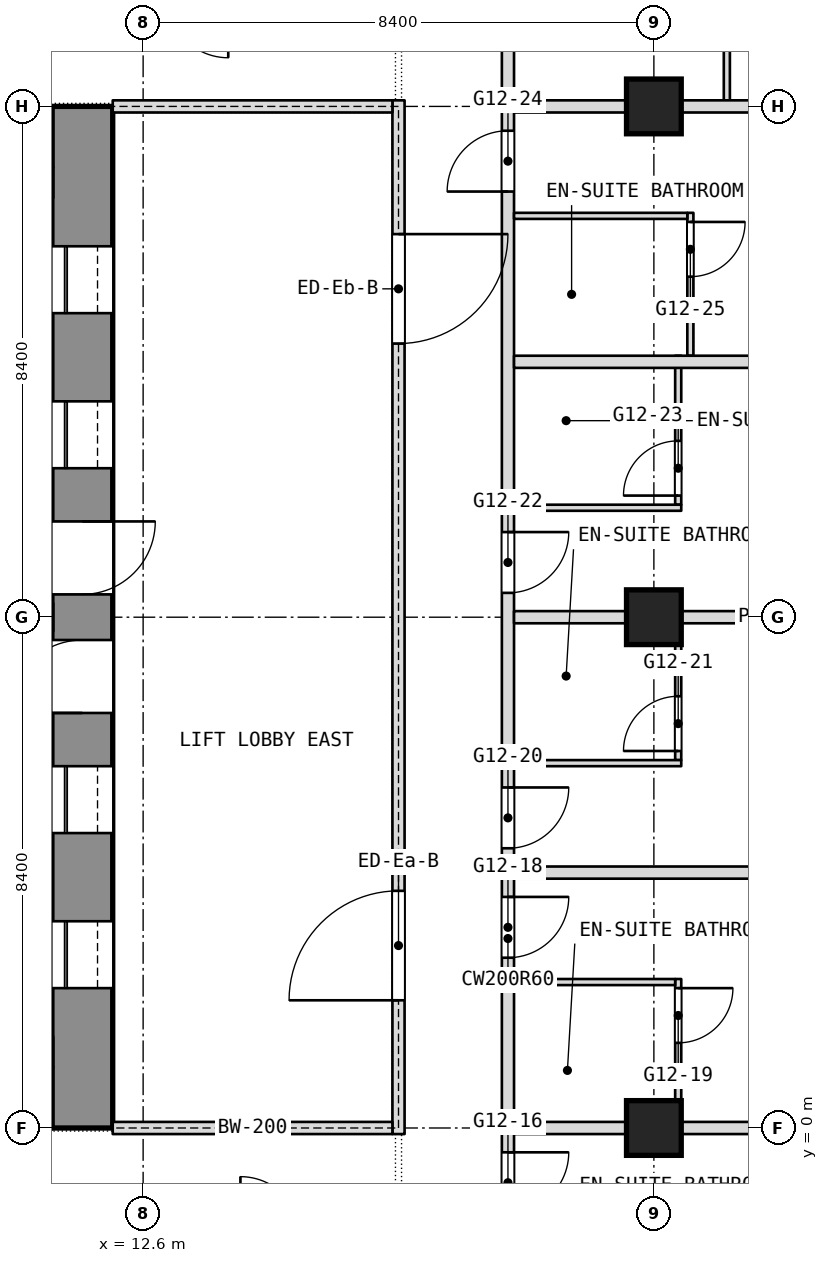
"""IFC4 building model, lengths in metres.
Left out: names, types, materials, properties, quantities, classifications, styles, units other than length and angle.
Written with IfcOpenShell. Run it as: python <this file> out.ifc"""

import sys

from ifc_helpers import new_model, si_unit, direction, frame, frame_2d, origin, origin_2d, place, context, subcontext, project, spatial, rectangle, extrude, element, fill, save


model = new_model("IFC4")
c1 = context("Model", 3, precision=1e-05, world=origin(), true_north=direction((0.0, 1.0)))
c2 = subcontext(c1, "Body", "Model", "MODEL_VIEW")
j1 = project(units=[si_unit("LENGTHUNIT", "METRE"), si_unit("PLANEANGLEUNIT", "RADIAN")], contexts=[c1])
p1 = place(None, origin())
s1 = spatial("IfcSite", under=j1, at=p1, CompositionType="ELEMENT")
p2 = place(p1, origin())
s2 = spatial("IfcBuilding", under=s1, at=p2, CompositionType="ELEMENT")
p3 = place(p2, frame((0.0, 0.0, 137.3)))
s3 = spatial("IfcBuildingStorey", under=s2, at=p3, CompositionType="ELEMENT", Elevation=137.3)
p4 = place(p3, frame((11.6, 0.0, 0.0), z_axis=(0.0, 0.0, 1.0), x_axis=(0.0, 1.0, 0.0)))
e1 = element("IfcWall", 1, at=p4, inside=s3, PredefinedType="SHEAR", context=c2, shape_type="SweptSolid", body=[
    extrude(rectangle(XDim=16.8, YDim=1.0, at=frame_2d((8.4, 0.0))), origin(), (0.0, 0.0, 1.0), 3.6),
])
p5 = place(p4, frame((2.3, 0.0, 0.0)))
e2 = element("IfcOpeningElement", 2, at=p5, cuts=e1, PredefinedType="OPENING", context=c2, shape_type="SweptSolid", body=[
    extrude(rectangle(XDim=1.1, YDim=2.1, at=frame_2d((0.55, 1.05))), frame((0.0, 0.5, 0.0), z_axis=(0.0, -1.0, 0.0), x_axis=(1.0, 0.0, 0.0)), (0.0, 0.0, 1.0), 1.0),
])
p6 = place(p4, frame((4.85, 0.0, 0.0)))
e3 = element("IfcOpeningElement", 3, at=p6, cuts=e1, PredefinedType="OPENING", context=c2, shape_type="SweptSolid", body=[
    extrude(rectangle(XDim=1.1, YDim=2.1, at=frame_2d((0.55, 1.05))), frame((0.0, 0.5, 0.0), z_axis=(0.0, -1.0, 0.0), x_axis=(1.0, 0.0, 0.0)), (0.0, 0.0, 1.0), 1.0),
])
p7 = place(p4, frame((6.825, 0.0, 0.0)))
e4 = element("IfcOpeningElement", 4, at=p7, cuts=e1, PredefinedType="OPENING", context=c2, shape_type="SweptSolid", body=[
    extrude(rectangle(XDim=1.2, YDim=2.1, at=frame_2d((0.6, 1.05))), frame((0.0, 0.5, 0.0), z_axis=(0.0, -1.0, 0.0), x_axis=(1.0, 0.0, 0.0)), (0.0, 0.0, 1.0), 1.0),
])
p8 = place(p4, frame((13.4, 0.0, 0.0)))
e5 = element("IfcOpeningElement", 5, at=p8, cuts=e1, PredefinedType="OPENING", context=c2, shape_type="SweptSolid", body=[
    extrude(rectangle(XDim=1.1, YDim=2.1, at=frame_2d((0.55, 1.05))), frame((0.0, 0.5, 0.0), z_axis=(0.0, -1.0, 0.0), x_axis=(1.0, 0.0, 0.0)), (0.0, 0.0, 1.0), 1.0),
])
p9 = place(p4, frame((10.85, 0.0, 0.0)))
e6 = element("IfcOpeningElement", 6, at=p9, cuts=e1, PredefinedType="OPENING", context=c2, shape_type="SweptSolid", body=[
    extrude(rectangle(XDim=1.1, YDim=2.1, at=frame_2d((0.55, 1.05))), frame((0.0, 0.5, 0.0), z_axis=(0.0, -1.0, 0.0), x_axis=(1.0, 0.0, 0.0)), (0.0, 0.0, 1.0), 1.0),
])
p10 = place(p4, frame((8.775, 0.0, 0.0)))
e7 = element("IfcOpeningElement", 7, at=p10, cuts=e1, PredefinedType="OPENING", context=c2, shape_type="SweptSolid", body=[
    extrude(rectangle(XDim=1.2, YDim=2.1, at=frame_2d((0.6, 1.05))), frame((0.0, 0.5, 0.0), z_axis=(0.0, -1.0, 0.0), x_axis=(1.0, 0.0, 0.0)), (0.0, 0.0, 1.0), 1.0),
])
for number, where, z_axis, x_axis in (
    (8, (21.0, 0.0, 0.0), (0.0, 0.0, 1.0), (1.0, 0.0, 0.0)),
    (9, (21.0, 8.4, 0.0), (0.0, 0.0, 1.0), (1.0, 0.0, 0.0)),
    (10, (21.0, 16.8, 0.0), (0.0, 0.0, 1.0), (1.0, 0.0, 0.0)),
):
    element("IfcColumn", number, at=place(p3, frame(where, z_axis=z_axis, x_axis=x_axis)), inside=s3, PredefinedType="COLUMN", context=c2, shape_type="SweptSolid", body=[
        extrude(rectangle(XDim=0.9, YDim=0.9, at=origin_2d()), origin(), (0.0, 0.0, 1.0), 3.6),
    ])
p11 = place(p3, frame((22.2, 16.9, 0.0), z_axis=(0.0, 0.0, 1.0), x_axis=(0.0, 1.0, 0.0)))
e11 = element("IfcWall", 11, at=p11, inside=s3, PredefinedType="PARTITIONING", context=c2, shape_type="SweptSolid", body=[
    extrude(rectangle(XDim=3.55, YDim=0.1, at=frame_2d((1.775, 0.0))), origin(), (0.0, 0.0, 1.0), 3.34),
])
p12 = place(p11, frame((2.5, 0.0, 0.0)))
e12 = element("IfcOpeningElement", 12, at=p12, cuts=e11, PredefinedType="OPENING", context=c2, shape_type="SweptSolid", body=[
    extrude(rectangle(XDim=0.9, YDim=2.1, at=frame_2d((0.45, 1.05))), frame((0.0, 0.05, 0.0), z_axis=(0.0, -1.0, 0.0), x_axis=(1.0, 0.0, 0.0)), (0.0, 0.0, 1.0), 0.1),
])
p13 = place(p3, frame((21.6, 12.7, 0.0), z_axis=(0.0, 0.0, 1.0), x_axis=(0.0, 1.0, 0.0)))
e13 = element("IfcWall", 13, at=p13, inside=s3, PredefinedType="PARTITIONING", context=c2, shape_type="SweptSolid", body=[
    extrude(rectangle(XDim=2.35, YDim=0.1, at=frame_2d((1.175, 0.0))), origin(), (0.0, 0.0, 1.0), 3.34),
])
p14 = place(p13, frame((1.3, 0.0, 0.0)))
e14 = element("IfcOpeningElement", 14, at=p14, cuts=e13, PredefinedType="OPENING", context=c2, shape_type="SweptSolid", body=[
    extrude(rectangle(XDim=0.9, YDim=2.1, at=frame_2d((0.45, 1.05))), frame((0.0, 0.05, 0.0), z_axis=(0.0, -1.0, 0.0), x_axis=(1.0, 0.0, 0.0)), (0.0, 0.0, 1.0), 0.1),
])
p15 = place(p3, frame((21.4, 0.1, 0.0), z_axis=(0.0, 0.0, 1.0), x_axis=(0.0, 1.0, 0.0)))
e15 = element("IfcWall", 15, at=p15, inside=s3, PredefinedType="PARTITIONING", context=c2, shape_type="SweptSolid", body=[
    extrude(rectangle(XDim=2.35, YDim=0.1, at=frame_2d((1.175, 0.0))), origin(), (0.0, 0.0, 1.0), 3.34),
])
p16 = place(p15, frame((1.3, 0.0, 0.0)))
e16 = element("IfcOpeningElement", 16, at=p16, cuts=e15, PredefinedType="OPENING", context=c2, shape_type="SweptSolid", body=[
    extrude(rectangle(XDim=0.9, YDim=2.1, at=frame_2d((0.45, 1.05))), frame((0.0, 0.05, 0.0), z_axis=(0.0, -1.0, 0.0), x_axis=(1.0, 0.0, 0.0)), (0.0, 0.0, 1.0), 0.1),
])
p17 = place(p3, frame((21.4, 6.05, 0.0), z_axis=(0.0, 0.0, 1.0), x_axis=(0.0, 1.0, 0.0)))
e17 = element("IfcWall", 17, at=p17, inside=s3, PredefinedType="PARTITIONING", context=c2, shape_type="SweptSolid", body=[
    extrude(rectangle(XDim=2.45, YDim=0.1, at=frame_2d((1.225, 0.0))), origin(), (0.0, 0.0, 1.0), 3.34),
])
p18 = place(p17, frame((0.15, 0.0, 0.0)))
e18 = element("IfcOpeningElement", 18, at=p18, cuts=e17, PredefinedType="OPENING", context=c2, shape_type="SweptSolid", body=[
    extrude(rectangle(XDim=0.9, YDim=2.1, at=frame_2d((0.45, 1.05))), frame((0.0, 0.05, 0.0), z_axis=(0.0, -1.0, 0.0), x_axis=(1.0, 0.0, 0.0)), (0.0, 0.0, 1.0), 0.1),
])
p19 = place(p3, frame((21.4, 10.25, 0.0), z_axis=(0.0, 0.0, 1.0), x_axis=(0.0, 1.0, 0.0)))
e19 = element("IfcWall", 19, at=p19, inside=s3, PredefinedType="PARTITIONING", context=c2, shape_type="SweptSolid", body=[
    extrude(rectangle(XDim=2.45, YDim=0.1, at=frame_2d((1.225, 0.0))), origin(), (0.0, 0.0, 1.0), 3.34),
])
p20 = place(p19, frame((0.15, 0.0, 0.0)))
e20 = element("IfcOpeningElement", 20, at=p20, cuts=e19, PredefinedType="OPENING", context=c2, shape_type="SweptSolid", body=[
    extrude(rectangle(XDim=0.9, YDim=2.1, at=frame_2d((0.45, 1.05))), frame((0.0, 0.05, 0.0), z_axis=(0.0, -1.0, 0.0), x_axis=(1.0, 0.0, 0.0)), (0.0, 0.0, 1.0), 0.1),
])
p21 = place(p3, frame((18.6, -21.708, 0.0), z_axis=(0.0, 0.0, 1.0), x_axis=(0.0, 1.0, 0.0)))
e21 = element("IfcWall", 21, at=p21, inside=s3, PredefinedType="PARTITIONING", context=c2, shape_type="SweptSolid", body=[
    extrude(rectangle(XDim=49.648, YDim=0.2, at=frame_2d((24.824, 0.0))), origin(), (0.0, 0.0, 1.0), 3.34),
])
p22 = place(p21, frame((2.8, 0.0, 0.0)))
e22 = element("IfcOpeningElement", 22, at=p22, cuts=e21, PredefinedType="OPENING", context=c2, shape_type="SweptSolid", body=[
    extrude(rectangle(XDim=1.0, YDim=2.1, at=frame_2d((0.5, 1.05))), frame((0.0, 0.1, 0.0), z_axis=(0.0, -1.0, 0.0), x_axis=(1.0, 0.0, 0.0)), (0.0, 0.0, 1.0), 0.2),
])
p23 = place(p21, frame((7.708, 0.0, 0.0)))
e23 = element("IfcOpeningElement", 23, at=p23, cuts=e21, PredefinedType="OPENING", context=c2, shape_type="SweptSolid", body=[
    extrude(rectangle(XDim=1.0, YDim=2.1, at=frame_2d((0.5, 1.05))), frame((0.0, 0.1, 0.0), z_axis=(0.0, -1.0, 0.0), x_axis=(1.0, 0.0, 0.0)), (0.0, 0.0, 1.0), 0.2),
])
p24 = place(p21, frame((9.508, 0.0, 0.0)))
e24 = element("IfcOpeningElement", 24, at=p24, cuts=e21, PredefinedType="OPENING", context=c2, shape_type="SweptSolid", body=[
    extrude(rectangle(XDim=1.0, YDim=2.1, at=frame_2d((0.5, 1.05))), frame((0.0, 0.1, 0.0), z_axis=(0.0, -1.0, 0.0), x_axis=(1.0, 0.0, 0.0)), (0.0, 0.0, 1.0), 0.2),
])
p25 = place(p21, frame((13.708, 0.0, 0.0)))
e25 = element("IfcOpeningElement", 25, at=p25, cuts=e21, PredefinedType="OPENING", context=c2, shape_type="SweptSolid", body=[
    extrude(rectangle(XDim=1.0, YDim=2.1, at=frame_2d((0.5, 1.05))), frame((0.0, 0.1, 0.0), z_axis=(0.0, -1.0, 0.0), x_axis=(1.0, 0.0, 0.0)), (0.0, 0.0, 1.0), 0.2),
])
p26 = place(p21, frame((20.308, 0.0, 0.0)))
e26 = element("IfcOpeningElement", 26, at=p26, cuts=e21, PredefinedType="OPENING", context=c2, shape_type="SweptSolid", body=[
    extrude(rectangle(XDim=1.0, YDim=2.1, at=frame_2d((0.5, 1.05))), frame((0.0, 0.1, 0.0), z_axis=(0.0, -1.0, 0.0), x_axis=(1.0, 0.0, 0.0)), (0.0, 0.0, 1.0), 0.2),
])
p27 = place(p21, frame((24.508, 0.0, 0.0)))
e27 = element("IfcOpeningElement", 27, at=p27, cuts=e21, PredefinedType="OPENING", context=c2, shape_type="SweptSolid", body=[
    extrude(rectangle(XDim=1.0, YDim=2.1, at=frame_2d((0.5, 1.05))), frame((0.0, 0.1, 0.0), z_axis=(0.0, -1.0, 0.0), x_axis=(1.0, 0.0, 0.0)), (0.0, 0.0, 1.0), 0.2),
])
p28 = place(p21, frame((26.308, 0.0, 0.0)))
e28 = element("IfcOpeningElement", 28, at=p28, cuts=e21, PredefinedType="OPENING", context=c2, shape_type="SweptSolid", body=[
    extrude(rectangle(XDim=1.0, YDim=2.1, at=frame_2d((0.5, 1.05))), frame((0.0, 0.1, 0.0), z_axis=(0.0, -1.0, 0.0), x_axis=(1.0, 0.0, 0.0)), (0.0, 0.0, 1.0), 0.2),
])
p29 = place(p21, frame((30.508, 0.0, 0.0)))
e29 = element("IfcOpeningElement", 29, at=p29, cuts=e21, PredefinedType="OPENING", context=c2, shape_type="SweptSolid", body=[
    extrude(rectangle(XDim=1.0, YDim=2.1, at=frame_2d((0.5, 1.05))), frame((0.0, 0.1, 0.0), z_axis=(0.0, -1.0, 0.0), x_axis=(1.0, 0.0, 0.0)), (0.0, 0.0, 1.0), 0.2),
])
p30 = place(p21, frame((37.108, 0.0, 0.0)))
e30 = element("IfcOpeningElement", 30, at=p30, cuts=e21, PredefinedType="OPENING", context=c2, shape_type="SweptSolid", body=[
    extrude(rectangle(XDim=1.0, YDim=2.1, at=frame_2d((0.5, 1.05))), frame((0.0, 0.1, 0.0), z_axis=(0.0, -1.0, 0.0), x_axis=(1.0, 0.0, 0.0)), (0.0, 0.0, 1.0), 0.2),
])
p31 = place(p21, frame((43.558, 0.0, 0.0)))
e31 = element("IfcOpeningElement", 31, at=p31, cuts=e21, PredefinedType="OPENING", context=c2, shape_type="SweptSolid", body=[
    extrude(rectangle(XDim=1.1, YDim=2.1, at=frame_2d((0.55, 1.05))), frame((0.0, 0.1, 0.0), z_axis=(0.0, -1.0, 0.0), x_axis=(1.0, 0.0, 0.0)), (0.0, 0.0, 1.0), 0.2),
])
p32 = place(p3, frame((18.7, 0.0, 0.0), z_axis=(0.0, 0.0, 1.0), x_axis=(1.0, 0.0, 0.0)))
e32 = element("IfcWall", 32, at=p32, inside=s3, PredefinedType="PARTITIONING", context=c2, shape_type="SweptSolid", body=[
    extrude(rectangle(XDim=8.9, YDim=0.2, at=frame_2d((4.45, 0.0))), origin(), (0.0, 0.0, 1.0), 2.89),
])
p33 = place(p3, frame((18.7, 2.4, 0.0), z_axis=(0.0, 0.0, 1.0), x_axis=(1.0, 0.0, 0.0)))
e33 = element("IfcWall", 33, at=p33, inside=s3, PredefinedType="PARTITIONING", context=c2, shape_type="SweptSolid", body=[
    extrude(rectangle(XDim=2.65, YDim=0.1, at=frame_2d((1.325, 0.0))), origin(), (0.0, 0.0, 1.0), 3.34),
])
p34 = place(p3, frame((18.7, 4.2, 0.0), z_axis=(0.0, 0.0, 1.0), x_axis=(1.0, 0.0, 0.0)))
e34 = element("IfcWall", 34, at=p34, inside=s3, PredefinedType="PARTITIONING", context=c2, shape_type="SweptSolid", body=[
    extrude(rectangle(XDim=6.8, YDim=0.2, at=frame_2d((3.4, 0.0))), origin(), (0.0, 0.0, 1.0), 3.34),
])
p35 = place(p3, frame((18.7, 6.0, 0.0), z_axis=(0.0, 0.0, 1.0), x_axis=(1.0, 0.0, 0.0)))
e35 = element("IfcWall", 35, at=p35, inside=s3, PredefinedType="PARTITIONING", context=c2, shape_type="SweptSolid", body=[
    extrude(rectangle(XDim=2.75, YDim=0.1, at=frame_2d((1.375, 0.0))), origin(), (0.0, 0.0, 1.0), 3.34),
])
p36 = place(p3, frame((18.7, 8.4, 0.0), z_axis=(0.0, 0.0, 1.0), x_axis=(1.0, 0.0, 0.0)))
e36 = element("IfcWall", 36, at=p36, inside=s3, PredefinedType="PARTITIONING", context=c2, shape_type="SweptSolid", body=[
    extrude(rectangle(XDim=8.9, YDim=0.2, at=frame_2d((4.45, 0.0))), origin(), (0.0, 0.0, 1.0), 2.89),
])
p37 = place(p3, frame((18.7, 10.2, 0.0), z_axis=(0.0, 0.0, 1.0), x_axis=(1.0, 0.0, 0.0)))
e37 = element("IfcWall", 37, at=p37, inside=s3, PredefinedType="PARTITIONING", context=c2, shape_type="SweptSolid", body=[
    extrude(rectangle(XDim=2.75, YDim=0.1, at=frame_2d((1.375, 0.0))), origin(), (0.0, 0.0, 1.0), 3.34),
])
p38 = place(p3, frame((18.7, 12.6, 0.0), z_axis=(0.0, 0.0, 1.0), x_axis=(1.0, 0.0, 0.0)))
e38 = element("IfcWall", 38, at=p38, inside=s3, PredefinedType="PARTITIONING", context=c2, shape_type="SweptSolid", body=[
    extrude(rectangle(XDim=8.9, YDim=0.2, at=frame_2d((4.45, 0.0))), origin(), (0.0, 0.0, 1.0), 3.34),
])
p39 = place(p3, frame((18.7, 15.0, 0.0), z_axis=(0.0, 0.0, 1.0), x_axis=(1.0, 0.0, 0.0)))
e39 = element("IfcWall", 39, at=p39, inside=s3, PredefinedType="PARTITIONING", context=c2, shape_type="SweptSolid", body=[
    extrude(rectangle(XDim=2.85, YDim=0.1, at=frame_2d((1.425, 0.0))), origin(), (0.0, 0.0, 1.0), 3.34),
])
p40 = place(p3, frame((18.7, 16.8, 0.0), z_axis=(0.0, 0.0, 1.0), x_axis=(1.0, 0.0, 0.0)))
e40 = element("IfcWall", 40, at=p40, inside=s3, PredefinedType="PARTITIONING", context=c2, shape_type="SweptSolid", body=[
    extrude(rectangle(XDim=8.9, YDim=0.2, at=frame_2d((4.45, 0.0))), origin(), (0.0, 0.0, 1.0), 2.89),
])
p41 = place(p3, frame((16.8, -0.1, 0.0), z_axis=(0.0, 0.0, 1.0), x_axis=(0.0, 1.0, 0.0)))
e41 = element("IfcWall", 41, at=p41, inside=s3, PredefinedType="PARTITIONING", context=c2, shape_type="SweptSolid", body=[
    extrude(rectangle(XDim=17.0, YDim=0.2, at=frame_2d((8.5, 0.0))), origin(), (0.0, 0.0, 1.0), 3.34),
])
p42 = place(p41, frame((2.2, 0.0, 0.0)))
e42 = element("IfcOpeningElement", 42, at=p42, cuts=e41, PredefinedType="OPENING", context=c2, shape_type="SweptSolid", body=[
    extrude(rectangle(XDim=1.8, YDim=2.1, at=frame_2d((0.9, 1.05))), frame((0.0, 0.1, 0.0), z_axis=(0.0, -1.0, 0.0), x_axis=(1.0, 0.0, 0.0)), (0.0, 0.0, 1.0), 0.2),
])
p43 = place(p41, frame((13.0, 0.0, 0.0)))
e43 = element("IfcOpeningElement", 43, at=p43, cuts=e41, PredefinedType="OPENING", context=c2, shape_type="SweptSolid", body=[
    extrude(rectangle(XDim=1.8, YDim=2.1, at=frame_2d((0.9, 1.05))), frame((0.0, 0.1, 0.0), z_axis=(0.0, -1.0, 0.0), x_axis=(1.0, 0.0, 0.0)), (0.0, 0.0, 1.0), 0.2),
])
for number, where, z_axis, x_axis in (
    (44, (12.1, 0.0, 0.0), (0.0, 0.0, 1.0), (1.0, 0.0, 0.0)),
    (45, (12.1, 16.8, 0.0), (0.0, 0.0, 1.0), (1.0, 0.0, 0.0)),
):
    element("IfcWall", number, at=place(p3, frame(where, z_axis=z_axis, x_axis=x_axis)), inside=s3, PredefinedType="PARTITIONING", context=c2, shape_type="SweptSolid", body=[
        extrude(rectangle(XDim=4.6, YDim=0.2, at=frame_2d((2.3, 0.0))), origin(), (0.0, 0.0, 1.0), 2.89),
    ])
p44 = place(p14, origin())
e46 = element("IfcDoor", 46, at=p44, inside=s3, OperationType="SINGLE_SWING_RIGHT", PredefinedType="DOOR", context=c2, shape_type="SweptSolid", body=[
    extrude(rectangle(XDim=0.9, YDim=2.1, at=frame_2d((0.45, 1.05))), frame((0.0, 0.025, 0.0), z_axis=(0.0, -1.0, 0.0), x_axis=(1.0, 0.0, 0.0)), (0.0, 0.0, 1.0), 0.05),
])
fill(e14, e46)
p45 = place(p16, origin())
e47 = element("IfcDoor", 47, at=p45, inside=s3, OperationType="SINGLE_SWING_RIGHT", PredefinedType="DOOR", context=c2, shape_type="SweptSolid", body=[
    extrude(rectangle(XDim=0.9, YDim=2.1, at=frame_2d((0.45, 1.05))), frame((0.0, 0.025, 0.0), z_axis=(0.0, -1.0, 0.0), x_axis=(1.0, 0.0, 0.0)), (0.0, 0.0, 1.0), 0.05),
])
fill(e16, e47)
p46 = place(p18, origin())
e48 = element("IfcDoor", 48, at=p46, inside=s3, OperationType="SINGLE_SWING_LEFT", PredefinedType="DOOR", context=c2, shape_type="SweptSolid", body=[
    extrude(rectangle(XDim=0.9, YDim=2.1, at=frame_2d((0.45, 1.05))), frame((0.0, 0.025, 0.0), z_axis=(0.0, -1.0, 0.0), x_axis=(1.0, 0.0, 0.0)), (0.0, 0.0, 1.0), 0.05),
])
fill(e18, e48)
p47 = place(p20, origin())
e49 = element("IfcDoor", 49, at=p47, inside=s3, OperationType="SINGLE_SWING_LEFT", PredefinedType="DOOR", context=c2, shape_type="SweptSolid", body=[
    extrude(rectangle(XDim=0.9, YDim=2.1, at=frame_2d((0.45, 1.05))), frame((0.0, 0.025, 0.0), z_axis=(0.0, -1.0, 0.0), x_axis=(1.0, 0.0, 0.0)), (0.0, 0.0, 1.0), 0.05),
])
fill(e20, e49)
p48 = place(p26, origin())
e50 = element("IfcDoor", 50, at=p48, inside=s3, OperationType="SINGLE_SWING_RIGHT", PredefinedType="DOOR", context=c2, shape_type="SweptSolid", body=[
    extrude(rectangle(XDim=1.0, YDim=2.1, at=frame_2d((0.5, 1.05))), frame((0.0, 0.025, 0.0), z_axis=(0.0, -1.0, 0.0), x_axis=(1.0, 0.0, 0.0)), (0.0, 0.0, 1.0), 0.05),
])
fill(e26, e50)
p49 = place(p27, origin())
e51 = element("IfcDoor", 51, at=p49, inside=s3, OperationType="SINGLE_SWING_RIGHT", PredefinedType="DOOR", context=c2, shape_type="SweptSolid", body=[
    extrude(rectangle(XDim=1.0, YDim=2.1, at=frame_2d((0.5, 1.05))), frame((0.0, 0.025, 0.0), z_axis=(0.0, -1.0, 0.0), x_axis=(1.0, 0.0, 0.0)), (0.0, 0.0, 1.0), 0.05),
])
fill(e27, e51)
p50 = place(p28, origin())
e52 = element("IfcDoor", 52, at=p50, inside=s3, OperationType="SINGLE_SWING_RIGHT", PredefinedType="DOOR", context=c2, shape_type="SweptSolid", body=[
    extrude(rectangle(XDim=1.0, YDim=2.1, at=frame_2d((0.5, 1.05))), frame((0.0, 0.025, 0.0), z_axis=(0.0, -1.0, 0.0), x_axis=(1.0, 0.0, 0.0)), (0.0, 0.0, 1.0), 0.05),
])
fill(e28, e52)
p51 = place(p29, origin())
e53 = element("IfcDoor", 53, at=p51, inside=s3, OperationType="SINGLE_SWING_RIGHT", PredefinedType="DOOR", context=c2, shape_type="SweptSolid", body=[
    extrude(rectangle(XDim=1.0, YDim=2.1, at=frame_2d((0.5, 1.05))), frame((0.0, 0.025, 0.0), z_axis=(0.0, -1.0, 0.0), x_axis=(1.0, 0.0, 0.0)), (0.0, 0.0, 1.0), 0.05),
])
fill(e29, e53)
p52 = place(p30, origin())
e54 = element("IfcDoor", 54, at=p52, inside=s3, OperationType="SINGLE_SWING_RIGHT", PredefinedType="DOOR", context=c2, shape_type="SweptSolid", body=[
    extrude(rectangle(XDim=1.0, YDim=2.1, at=frame_2d((0.5, 1.05))), frame((0.0, 0.025, 0.0), z_axis=(0.0, -1.0, 0.0), x_axis=(1.0, 0.0, 0.0)), (0.0, 0.0, 1.0), 0.05),
])
fill(e30, e54)
p53 = place(p5, origin())
e55 = element("IfcDoor", 55, at=p53, inside=s3, OperationType="SLIDING_TO_LEFT", PredefinedType="DOOR", context=c2, shape_type="SweptSolid", body=[
    extrude(rectangle(XDim=1.1, YDim=2.1, at=frame_2d((0.55, 1.05))), frame((0.0, 0.025, 0.0), z_axis=(0.0, -1.0, 0.0), x_axis=(1.0, 0.0, 0.0)), (0.0, 0.0, 1.0), 0.05),
])
fill(e2, e55)
p54 = place(p6, origin())
e56 = element("IfcDoor", 56, at=p54, inside=s3, OperationType="SLIDING_TO_LEFT", PredefinedType="DOOR", context=c2, shape_type="SweptSolid", body=[
    extrude(rectangle(XDim=1.1, YDim=2.1, at=frame_2d((0.55, 1.05))), frame((0.0, 0.025, 0.0), z_axis=(0.0, -1.0, 0.0), x_axis=(1.0, 0.0, 0.0)), (0.0, 0.0, 1.0), 0.05),
])
fill(e3, e56)
p55 = place(p7, origin())
e57 = element("IfcDoor", 57, at=p55, inside=s3, OperationType="SINGLE_SWING_LEFT", PredefinedType="DOOR", context=c2, shape_type="SweptSolid", body=[
    extrude(rectangle(XDim=1.2, YDim=2.1, at=frame_2d((0.6, 1.05))), frame((0.0, 0.025, 0.0), z_axis=(0.0, -1.0, 0.0), x_axis=(1.0, 0.0, 0.0)), (0.0, 0.0, 1.0), 0.05),
])
fill(e4, e57)
p56 = place(p8, origin())
e58 = element("IfcDoor", 58, at=p56, inside=s3, OperationType="SLIDING_TO_LEFT", PredefinedType="DOOR", context=c2, shape_type="SweptSolid", body=[
    extrude(rectangle(XDim=1.1, YDim=2.1, at=frame_2d((0.55, 1.05))), frame((0.0, 0.025, 0.0), z_axis=(0.0, -1.0, 0.0), x_axis=(1.0, 0.0, 0.0)), (0.0, 0.0, 1.0), 0.05),
])
fill(e5, e58)
p57 = place(p9, origin())
e59 = element("IfcDoor", 59, at=p57, inside=s3, OperationType="SLIDING_TO_LEFT", PredefinedType="DOOR", context=c2, shape_type="SweptSolid", body=[
    extrude(rectangle(XDim=1.1, YDim=2.1, at=frame_2d((0.55, 1.05))), frame((0.0, 0.025, 0.0), z_axis=(0.0, -1.0, 0.0), x_axis=(1.0, 0.0, 0.0)), (0.0, 0.0, 1.0), 0.05),
])
fill(e6, e59)
p58 = place(p10, origin())
e60 = element("IfcDoor", 60, at=p58, inside=s3, OperationType="SINGLE_SWING_LEFT", PredefinedType="DOOR", context=c2, shape_type="SweptSolid", body=[
    extrude(rectangle(XDim=1.2, YDim=2.1, at=frame_2d((0.6, 1.05))), frame((0.0, 0.025, 0.0), z_axis=(0.0, -1.0, 0.0), x_axis=(1.0, 0.0, 0.0)), (0.0, 0.0, 1.0), 0.05),
])
fill(e7, e60)
p59 = place(p42, origin())
e61 = element("IfcDoor", 61, at=p59, inside=s3, OperationType="DOUBLE_DOOR_SINGLE_SWING", PredefinedType="DOOR", context=c2, shape_type="SweptSolid", body=[
    extrude(rectangle(XDim=1.8, YDim=2.1, at=frame_2d((0.9, 1.05))), frame((0.0, 0.025, 0.0), z_axis=(0.0, -1.0, 0.0), x_axis=(1.0, 0.0, 0.0)), (0.0, 0.0, 1.0), 0.05),
])
fill(e42, e61)
p60 = place(p43, origin())
e62 = element("IfcDoor", 62, at=p60, inside=s3, OperationType="DOUBLE_DOOR_SINGLE_SWING", PredefinedType="DOOR", context=c2, shape_type="SweptSolid", body=[
    extrude(rectangle(XDim=1.8, YDim=2.1, at=frame_2d((0.9, 1.05))), frame((0.0, 0.025, 0.0), z_axis=(0.0, -1.0, 0.0), x_axis=(1.0, 0.0, 0.0)), (0.0, 0.0, 1.0), 0.05),
])
fill(e43, e62)
save(model, sys.argv[1])
